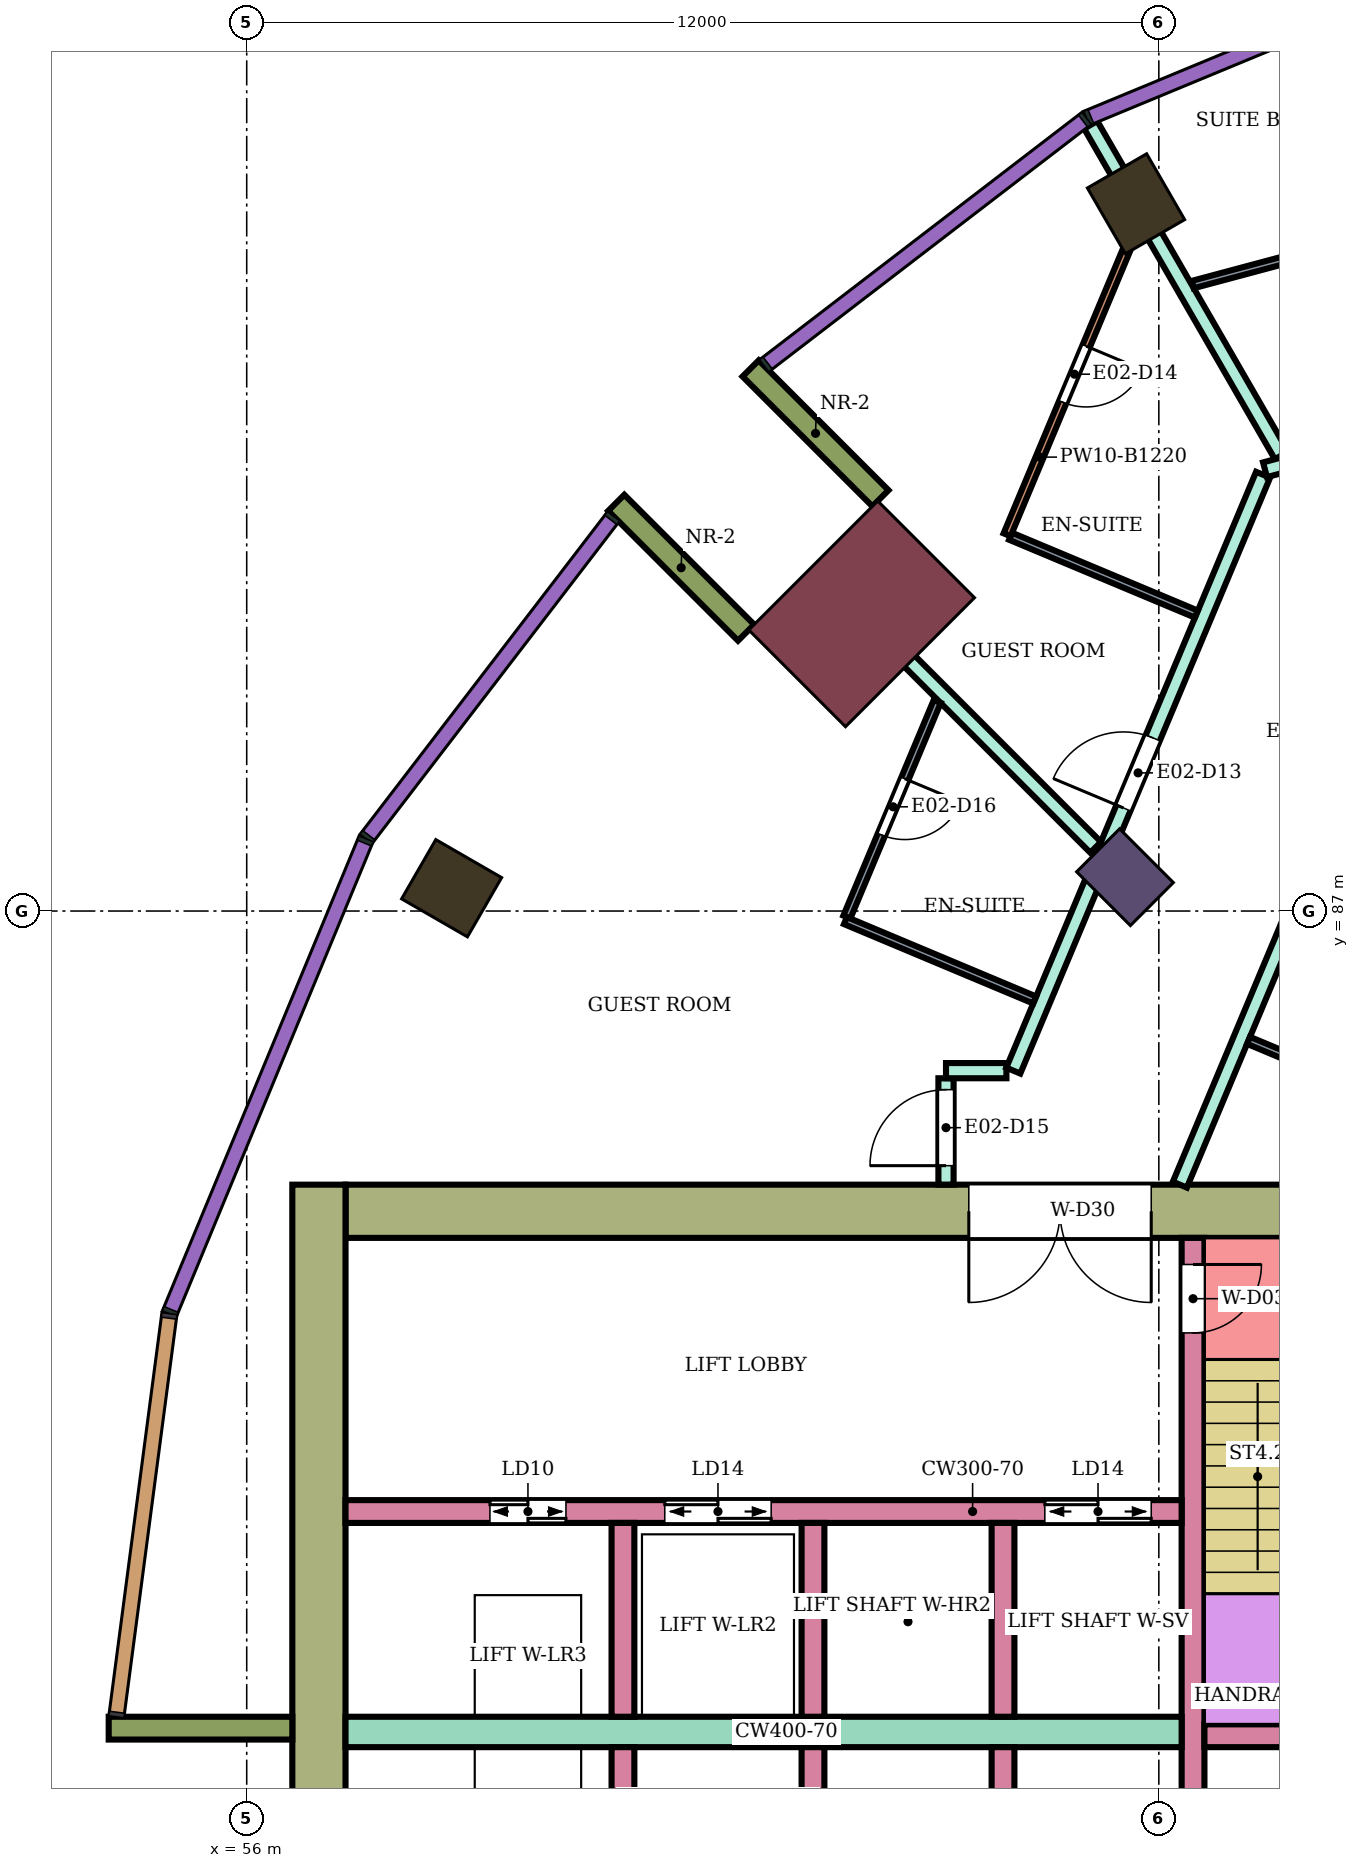
"""IFC4 building model, lengths in metres.
Left out: names, types, materials, properties, quantities, classifications, styles, units other than length and angle.
Written with IfcOpenShell. Run it as: python <this file> out.ifc"""

import sys

from ifc_helpers import new_model, si_unit, direction, frame, frame_2d, origin, origin_2d, place, context, subcontext, project, spatial, rectangle, extrude, element, fill, save


model = new_model("IFC4")
c1 = context("Model", 3, precision=1e-05, world=origin(), true_north=direction((0.0, 1.0)))
c2 = subcontext(c1, "Body", "Model", "MODEL_VIEW")
j1 = project(units=[si_unit("LENGTHUNIT", "METRE"), si_unit("PLANEANGLEUNIT", "RADIAN")], contexts=[c1])
p1 = place(None, origin())
s1 = spatial("IfcSite", under=j1, at=p1, CompositionType="ELEMENT")
p2 = place(p1, origin())
s2 = spatial("IfcBuilding", under=s1, at=p2, CompositionType="ELEMENT")
p3 = place(p2, frame((0.0, 0.0, 126.3)))
s3 = spatial("IfcBuildingStorey", under=s2, at=p3, CompositionType="ELEMENT", Elevation=126.3)
for number, where, z_axis, x_axis in (
    (1, (67.7, 96.304, 0.0), (0.0, 0.0, 1.0), (-0.5, 0.866, 0.0)),
    (2, (58.696, 87.3, 0.0), (0.0, 0.0, 1.0), (-0.866, 0.5, 0.0)),
):
    element("IfcColumn", number, at=place(p3, frame(where, z_axis=z_axis, x_axis=x_axis)), inside=s3, PredefinedType="COLUMN", context=c2, shape_type="SweptSolid", body=[
        extrude(rectangle(XDim=1.0, YDim=0.9, at=origin_2d()), origin(), (0.0, 0.0, 1.0), 3.9),
    ])
p4 = place(p3, frame((67.555, 87.445, 0.0), z_axis=(0.0, 0.0, 1.0), x_axis=(-0.707106781187, 0.707106781187, 0.0)))
e3 = element("IfcColumn", 3, at=p4, inside=s3, PredefinedType="COLUMN", context=c2, shape_type="SweptSolid", body=[
    extrude(rectangle(XDim=1.0, YDim=0.8, at=origin_2d()), origin(), (0.0, 0.0, 1.0), 3.9),
])
p5 = place(p3, frame((64.09, 90.91, 0.0), z_axis=(0.0, 0.0, 1.0), x_axis=(-0.707106781187, 0.707106781187, 0.0)))
e4 = element("IfcColumn", 4, at=p5, inside=s3, PredefinedType="COLUMN", context=c2, shape_type="SweptSolid", body=[
    extrude(rectangle(XDim=1.8, YDim=2.4, at=origin_2d()), origin(), (0.0, 0.0, 1.0), 3.9),
])
p6 = place(p3, frame((72.1, 83.05, 0.0), z_axis=(0.0, 0.0, 1.0), x_axis=(-1.0, 0.0, 0.0)))
e5 = element("IfcWall", 5, at=p6, inside=s3, PredefinedType="SHEAR", context=c2, shape_type="SweptSolid", body=[
    extrude(rectangle(XDim=14.8, YDim=0.7, at=frame_2d((7.4, 0.0))), origin(), (0.0, 0.0, 1.0), 3.58),
])
p7 = place(p6, frame((4.2, 0.0, 0.0)))
e6 = element("IfcOpeningElement", 6, at=p7, cuts=e5, PredefinedType="OPENING", context=c2, shape_type="SweptSolid", body=[
    extrude(rectangle(XDim=2.4, YDim=2.4, at=frame_2d((1.2, 1.2))), frame((0.0, 0.36, 0.0), z_axis=(0.0, -1.0, 0.0), x_axis=(1.0, 0.0, 0.0)), (0.0, 0.0, 1.0), 0.72),
])
p8 = place(p3, frame((56.95, 83.4, 0.0), z_axis=(0.0, 0.0, 1.0), x_axis=(0.0, -1.0, 0.0)))
e7 = element("IfcWall", 7, at=p8, inside=s3, PredefinedType="SHEAR", context=c2, shape_type="SweptSolid", body=[
    extrude(rectangle(XDim=16.8, YDim=0.7, at=frame_2d((8.4, 0.0))), origin(), (0.0, 0.0, 1.0), 3.58),
])
p9 = place(p3, frame((68.45, 82.7, 0.0), z_axis=(0.0, 0.0, 1.0), x_axis=(0.0, -1.0, 0.0)))
e8 = element("IfcWall", 8, at=p9, inside=s3, PredefinedType="SHEAR", context=c2, shape_type="SweptSolid", body=[
    extrude(rectangle(XDim=7.7, YDim=0.3, at=frame_2d((3.85, 0.0))), origin(), (0.0, 0.0, 1.0), 3.58),
])
p10 = place(p9, frame((0.35, 0.0, 0.0)))
e9 = element("IfcOpeningElement", 9, at=p10, cuts=e8, PredefinedType="OPENING", context=c2, shape_type="SweptSolid", body=[
    extrude(rectangle(XDim=0.9, YDim=2.1, at=frame_2d((0.45, 1.05))), frame((0.0, 0.16, 0.0), z_axis=(0.0, -1.0, 0.0), x_axis=(1.0, 0.0, 0.0)), (0.0, 0.0, 1.0), 0.32),
])
p11 = place(p3, frame((71.65, 76.15, 0.0), z_axis=(0.0, 0.0, 1.0), x_axis=(-1.0, 0.0, 0.0)))
e10 = element("IfcWall", 10, at=p11, inside=s3, PredefinedType="SHEAR", context=c2, shape_type="SweptSolid", body=[
    extrude(rectangle(XDim=3.05, YDim=0.3, at=frame_2d((1.525, 0.0))), origin(), (0.0, 0.0, 1.0), 3.58),
])
p12 = place(p3, frame((68.3, 76.2, 0.0), z_axis=(0.0, 0.0, 1.0), x_axis=(-1.0, 0.0, 0.0)))
e11 = element("IfcWall", 11, at=p12, inside=s3, PredefinedType="SHEAR", context=c2, shape_type="SweptSolid", body=[
    extrude(rectangle(XDim=11.0, YDim=0.4, at=frame_2d((5.5, 0.0))), origin(), (0.0, 0.0, 1.0), 3.58),
])
p13 = place(p3, frame((68.3, 79.1, 0.0), z_axis=(0.0, 0.0, 1.0), x_axis=(-1.0, 0.0, 0.0)))
e12 = element("IfcWall", 12, at=p13, inside=s3, PredefinedType="SHEAR", context=c2, shape_type="SweptSolid", body=[
    extrude(rectangle(XDim=11.0, YDim=0.3, at=frame_2d((5.5, 0.0))), origin(), (0.0, 0.0, 1.0), 3.58),
])
p14 = place(p13, frame((0.4, 0.0, 0.0)))
e13 = element("IfcOpeningElement", 13, at=p14, cuts=e12, PredefinedType="OPENING", context=c2, shape_type="SweptSolid", body=[
    extrude(rectangle(XDim=1.4, YDim=2.1, at=frame_2d((0.7, 1.05))), frame((0.0, 0.16, 0.0), z_axis=(0.0, -1.0, 0.0), x_axis=(1.0, 0.0, 0.0)), (0.0, 0.0, 1.0), 0.32),
])
p15 = place(p13, frame((5.4, 0.0, 0.0)))
e14 = element("IfcOpeningElement", 14, at=p15, cuts=e12, PredefinedType="OPENING", context=c2, shape_type="SweptSolid", body=[
    extrude(rectangle(XDim=1.4, YDim=2.1, at=frame_2d((0.7, 1.05))), frame((0.0, 0.16, 0.0), z_axis=(0.0, -1.0, 0.0), x_axis=(1.0, 0.0, 0.0)), (0.0, 0.0, 1.0), 0.32),
])
p16 = place(p13, frame((8.1, 0.0, 0.0)))
e15 = element("IfcOpeningElement", 15, at=p16, cuts=e12, PredefinedType="OPENING", context=c2, shape_type="SweptSolid", body=[
    extrude(rectangle(XDim=1.0, YDim=2.1, at=frame_2d((0.5, 1.05))), frame((0.0, 0.16, 0.0), z_axis=(0.0, -1.0, 0.0), x_axis=(1.0, 0.0, 0.0)), (0.0, 0.0, 1.0), 0.32),
])
for number, where, z_axis, x_axis in (
    (16, (65.95, 76.0, 0.0), (0.0, 0.0, 1.0), (0.0, -1.0, 0.0)),
    (17, (63.45, 76.0, 0.0), (0.0, 0.0, 1.0), (0.0, -1.0, 0.0)),
    (18, (60.95, 76.0, 0.0), (0.0, 0.0, 1.0), (0.0, -1.0, 0.0)),
    (19, (65.95, 78.95, 0.0), (0.0, 0.0, 1.0), (0.0, -1.0, 0.0)),
    (20, (63.45, 78.95, 0.0), (0.0, 0.0, 1.0), (0.0, -1.0, 0.0)),
    (21, (60.95, 78.95, 0.0), (0.0, 0.0, 1.0), (0.0, -1.0, 0.0)),
):
    element("IfcWall", number, at=place(p3, frame(where, z_axis=z_axis, x_axis=x_axis)), inside=s3, PredefinedType="SHEAR", context=c2, shape_type="SweptSolid", body=[
        extrude(rectangle(XDim=2.55, YDim=0.3, at=frame_2d((1.275, 0.0))), origin(), (0.0, 0.0, 1.0), 3.58),
    ])
for number, where, z_axis, x_axis in (
    (22, (64.338, 92.43, 0.0), (0.0, 0.0, 1.0), (-0.707, 0.707, 0.0)),
    (23, (62.57, 90.662, 0.0), (0.0, 0.0, 1.0), (-0.707, 0.707, 0.0)),
    (24, (56.6, 76.25, 0.0), (0.0, 0.0, 1.0), (-1.0, 0.0, 0.0)),
):
    element("IfcWall", number, at=place(p3, frame(where, z_axis=z_axis, x_axis=x_axis)), inside=s3, PredefinedType="NOTDEFINED", context=c2, shape_type="SweptSolid", body=[
        extrude(rectangle(XDim=2.416, YDim=0.3, at=frame_2d((1.208, 0.0))), origin(), (0.0, 0.0, 1.0), 3.9),
    ])
p17 = place(p3, frame((63.6, 91.409, 0.0), z_axis=(0.0, 0.0, 1.0), x_axis=(0.706937509868, -0.707276011993, 0.0)))
e25 = element("IfcWall", 25, at=p17, inside=s3, PredefinedType="PARTITIONING", context=c2, shape_type="SweptSolid", body=[
    extrude(rectangle(XDim=5.049, YDim=0.2, at=frame_2d((2.524, 0.0))), origin(), (0.0, 0.0, 1.0), 3.45),
])
p18 = place(p3, frame((65.2, 83.401, 0.0), z_axis=(0.0, 0.0, 1.0), x_axis=(0.0, 1.0, 0.0)))
e26 = element("IfcWall", 26, at=p18, inside=s3, PredefinedType="PARTITIONING", context=c2, shape_type="SweptSolid", body=[
    extrude(rectangle(XDim=1.399, YDim=0.2, at=frame_2d((0.7, 0.0))), origin(), (0.0, 0.0, 1.0), 3.45),
])
p19 = place(p18, frame((0.249, 0.0, 0.0)))
e27 = element("IfcOpeningElement", 27, at=p19, cuts=e26, PredefinedType="OPENING", context=c2, shape_type="SweptSolid", body=[
    extrude(rectangle(XDim=1.0, YDim=2.1, at=frame_2d((0.5, 1.05))), frame((0.0, 0.11, 0.0), z_axis=(0.0, -1.0, 0.0), x_axis=(1.0, 0.0, 0.0)), (0.0, 0.0, 1.0), 0.22),
])
p20 = place(p3, frame((65.2, 84.9, 0.0), z_axis=(0.0, 0.0, 1.0), x_axis=(1.0, 0.0, 0.0)))
e28 = element("IfcWall", 28, at=p20, inside=s3, PredefinedType="PARTITIONING", context=c2, shape_type="SweptSolid", body=[
    extrude(rectangle(XDim=0.795, YDim=0.2, at=frame_2d((0.397, 0.0))), origin(), (0.0, 0.0, 1.0), 3.45),
])
p21 = place(p3, frame((66.085, 84.9, 0.0), z_axis=(0.0, 0.0, 1.0), x_axis=(0.386617151403, 0.922240303956, 0.0)))
e29 = element("IfcWall", 29, at=p21, inside=s3, PredefinedType="PARTITIONING", context=c2, shape_type="SweptSolid", body=[
    extrude(rectangle(XDim=8.5, YDim=0.2, at=frame_2d((4.25, 0.0))), origin(), (0.0, 0.0, 1.0), 3.45),
])
p22 = place(p21, frame((3.748, 0.0, 0.0)))
e30 = element("IfcOpeningElement", 30, at=p22, cuts=e29, PredefinedType="OPENING", context=c2, shape_type="SweptSolid", body=[
    extrude(rectangle(XDim=1.0, YDim=2.1, at=frame_2d((0.5, 1.05))), frame((0.0, 0.11, 0.0), z_axis=(0.0, -1.0, 0.0), x_axis=(1.0, 0.0, 0.0)), (0.0, 0.0, 1.0), 0.22),
])
p23 = place(p3, frame((67.104, 97.343, 0.0), z_axis=(0.0, 0.0, 1.0), x_axis=(0.499893606134, -0.866086821598, 0.0)))
e31 = element("IfcWall", 31, at=p23, inside=s3, PredefinedType="PARTITIONING", context=c2, shape_type="SweptSolid", body=[
    extrude(rectangle(XDim=5.021, YDim=0.2, at=frame_2d((2.511, 0.0))), origin(), (0.0, 0.0, 1.0), 3.45),
])
p24 = place(p3, frame((68.277, 83.4, 0.0), z_axis=(0.0, 0.0, 1.0), x_axis=(0.386454861164, 0.922308321703, 0.0)))
e32 = element("IfcWall", 32, at=p24, inside=s3, PredefinedType="PARTITIONING", context=c2, shape_type="SweptSolid", body=[
    extrude(rectangle(XDim=7.762, YDim=0.2, at=frame_2d((3.881, 0.0))), origin(), (0.0, 0.0, 1.0), 3.45),
])
p25 = place(p24, frame((5.351, 0.0, 0.0)))
e33 = element("IfcOpeningElement", 33, at=p25, cuts=e32, PredefinedType="OPENING", context=c2, shape_type="SweptSolid", body=[
    extrude(rectangle(XDim=1.0, YDim=2.1, at=frame_2d((0.5, 1.05))), frame((0.0, 0.11, 0.0), z_axis=(0.0, -1.0, 0.0), x_axis=(1.0, 0.0, 0.0)), (0.0, 0.0, 1.0), 0.22),
])
p26 = place(p3, frame((69.397, 92.805, 0.0), z_axis=(0.0, 0.0, 1.0), x_axis=(0.965971666602, 0.258647906087, 0.0)))
e34 = element("IfcWall", 34, at=p26, inside=s3, PredefinedType="PARTITIONING", context=c2, shape_type="SweptSolid", body=[
    extrude(rectangle(XDim=10.887, YDim=0.2, at=frame_2d((5.443, 0.0))), origin(), (0.0, 0.0, 1.0), 3.45),
])
p27 = place(p26, frame((6.163, 0.0, 0.0)))
e35 = element("IfcOpeningElement", 35, at=p27, cuts=e34, PredefinedType="OPENING", context=c2, shape_type="SweptSolid", body=[
    extrude(rectangle(XDim=1.0, YDim=2.1, at=frame_2d((0.5, 1.05))), frame((0.0, 0.11, 0.0), z_axis=(0.0, -1.0, 0.0), x_axis=(1.0, 0.0, 0.0)), (0.0, 0.0, 1.0), 0.22),
])
p28 = place(p26, frame((2.461, 0.0, 0.0)))
e36 = element("IfcOpeningElement", 36, at=p28, cuts=e34, PredefinedType="OPENING", context=c2, shape_type="SweptSolid", body=[
    extrude(rectangle(XDim=1.0, YDim=2.1, at=frame_2d((0.5, 1.05))), frame((0.0, 0.11, 0.0), z_axis=(0.0, -1.0, 0.0), x_axis=(1.0, 0.0, 0.0)), (0.0, 0.0, 1.0), 0.22),
])
p29 = place(p3, frame((63.896, 86.92, 0.0), z_axis=(0.0, 0.0, 1.0), x_axis=(0.386637413037, 0.922231809709, 0.0)))
e37 = element("IfcWall", 37, at=p29, inside=s3, PredefinedType="PARTITIONING", context=c2, shape_type="SweptSolid", body=[
    extrude(rectangle(XDim=3.076, YDim=0.1, at=frame_2d((1.538, 0.0))), origin(), (0.0, 0.0, 1.0), 3.45),
])
p30 = place(p29, frame((1.173, 0.0, 0.0)))
e38 = element("IfcOpeningElement", 38, at=p30, cuts=e37, PredefinedType="OPENING", context=c2, shape_type="SweptSolid", body=[
    extrude(rectangle(XDim=0.8, YDim=2.1, at=frame_2d((0.4, 1.05))), frame((0.0, 0.06, 0.0), z_axis=(0.0, -1.0, 0.0), x_axis=(1.0, 0.0, 0.0)), (0.0, 0.0, 1.0), 0.12),
])
p31 = place(p3, frame((63.877, 86.874, 0.0), z_axis=(0.0, 0.0, 1.0), x_axis=(0.92214860299, -0.386835823062, 0.0)))
e39 = element("IfcWall", 39, at=p31, inside=s3, PredefinedType="PARTITIONING", context=c2, shape_type="SweptSolid", body=[
    extrude(rectangle(XDim=2.7, YDim=0.1, at=frame_2d((1.35, 0.0))), origin(), (0.0, 0.0, 1.0), 3.45),
])
p32 = place(p3, frame((66.049, 91.931, 0.0), z_axis=(0.0, 0.0, 1.0), x_axis=(0.922344808264, -0.38636777126, 0.0)))
e40 = element("IfcWall", 40, at=p32, inside=s3, PredefinedType="PARTITIONING", context=c2, shape_type="SweptSolid", body=[
    extrude(rectangle(XDim=2.65, YDim=0.1, at=frame_2d((1.325, 0.0))), origin(), (0.0, 0.0, 1.0), 3.45),
])
p33 = place(p3, frame((66.004, 91.95, 0.0), z_axis=(0.0, 0.0, 1.0), x_axis=(0.386601257709, 0.922246966673, 0.0)))
e41 = element("IfcWall", 41, at=p33, inside=s3, PredefinedType="PARTITIONING", context=c2, shape_type="SweptSolid", body=[
    extrude(rectangle(XDim=4.433, YDim=0.1, at=frame_2d((2.216, 0.0))), origin(), (0.0, 0.0, 1.0), 2.68),
])
p34 = place(p33, frame((1.891, 0.0, 0.0)))
e42 = element("IfcOpeningElement", 42, at=p34, cuts=e41, PredefinedType="OPENING", context=c2, shape_type="SweptSolid", body=[
    extrude(rectangle(XDim=0.8, YDim=2.1, at=frame_2d((0.4, 1.05))), frame((0.0, 0.06, 0.0), z_axis=(0.0, -1.0, 0.0), x_axis=(1.0, 0.0, 0.0)), (0.0, 0.0, 1.0), 0.12),
])
p35 = place(p3, frame((68.447, 95.242, 0.0), z_axis=(0.0, 0.0, 1.0), x_axis=(0.965958178477, 0.258698274894, 0.0)))
e43 = element("IfcWall", 43, at=p35, inside=s3, PredefinedType="PARTITIONING", context=c2, shape_type="SweptSolid", body=[
    extrude(rectangle(XDim=5.81, YDim=0.1, at=frame_2d((2.905, 0.0))), origin(), (0.0, 0.0, 1.0), 3.45),
])
p36 = place(p35, frame((1.46, 0.0, 0.0)))
e44 = element("IfcOpeningElement", 44, at=p36, cuts=e43, PredefinedType="OPENING", context=c2, shape_type="SweptSolid", body=[
    extrude(rectangle(XDim=0.9, YDim=2.1, at=frame_2d((0.45, 1.05))), frame((0.0, 0.06, 0.0), z_axis=(0.0, -1.0, 0.0), x_axis=(1.0, 0.0, 0.0)), (0.0, 0.0, 1.0), 0.12),
])
p37 = place(p3, frame((69.181, 85.298, 0.0), z_axis=(0.0, 0.0, 1.0), x_axis=(0.922377635784, -0.38628939541, 0.0)))
e45 = element("IfcWall", 45, at=p37, inside=s3, PredefinedType="PARTITIONING", context=c2, shape_type="SweptSolid", body=[
    extrude(rectangle(XDim=2.65, YDim=0.1, at=frame_2d((1.325, 0.0))), origin(), (0.0, 0.0, 1.0), 3.45),
])
p38 = place(p37, frame((0.9, 0.0, 0.0)))
e46 = element("IfcOpeningElement", 46, at=p38, cuts=e45, PredefinedType="OPENING", context=c2, shape_type="SweptSolid", body=[
    extrude(rectangle(XDim=0.8, YDim=2.1, at=frame_2d((0.4, 1.05))), frame((0.0, 0.06, 0.0), z_axis=(0.0, -1.0, 0.0), x_axis=(1.0, 0.0, 0.0)), (0.0, 0.0, 1.0), 0.12),
])
p39 = place(p22, origin())
e47 = element("IfcDoor", 47, at=p39, inside=s3, OperationType="SINGLE_SWING_LEFT", PredefinedType="DOOR", context=c2, shape_type="SweptSolid", body=[
    extrude(rectangle(XDim=1.0, YDim=2.1, at=frame_2d((0.5, 1.05))), frame((0.0, 0.025, 0.0), z_axis=(0.0, -1.0, 0.0), x_axis=(1.0, 0.0, 0.0)), (0.0, 0.0, 1.0), 0.05),
])
fill(e30, e47)
p40 = place(p34, frame((0.8, 0.0, 0.0), z_axis=(0.0, 0.0, 1.0), x_axis=(-1.0, 0.0, 0.0)))
e48 = element("IfcDoor", 48, at=p40, inside=s3, OperationType="SINGLE_SWING_LEFT", PredefinedType="DOOR", context=c2, shape_type="SweptSolid", body=[
    extrude(rectangle(XDim=0.8, YDim=2.1, at=frame_2d((0.4, 1.05))), frame((0.0, 0.025, 0.0), z_axis=(0.0, -1.0, 0.0), x_axis=(1.0, 0.0, 0.0)), (0.0, 0.0, 1.0), 0.05),
])
fill(e42, e48)
p41 = place(p19, origin())
e49 = element("IfcDoor", 49, at=p41, inside=s3, OperationType="SINGLE_SWING_LEFT", PredefinedType="DOOR", context=c2, shape_type="SweptSolid", body=[
    extrude(rectangle(XDim=1.0, YDim=2.1, at=frame_2d((0.5, 1.05))), frame((0.0, 0.025, 0.0), z_axis=(0.0, -1.0, 0.0), x_axis=(1.0, 0.0, 0.0)), (0.0, 0.0, 1.0), 0.05),
])
fill(e27, e49)
p42 = place(p30, frame((0.8, 0.0, 0.0), z_axis=(0.0, 0.0, 1.0), x_axis=(-1.0, 0.0, 0.0)))
e50 = element("IfcDoor", 50, at=p42, inside=s3, OperationType="SINGLE_SWING_LEFT", PredefinedType="DOOR", context=c2, shape_type="SweptSolid", body=[
    extrude(rectangle(XDim=0.8, YDim=2.1, at=frame_2d((0.4, 1.05))), frame((0.0, 0.025, 0.0), z_axis=(0.0, -1.0, 0.0), x_axis=(1.0, 0.0, 0.0)), (0.0, 0.0, 1.0), 0.05),
])
fill(e38, e50)
p43 = place(p10, origin())
e51 = element("IfcDoor", 51, at=p43, inside=s3, OperationType="SINGLE_SWING_LEFT", PredefinedType="DOOR", context=c2, shape_type="SweptSolid", body=[
    extrude(rectangle(XDim=0.9, YDim=2.1, at=frame_2d((0.45, 1.05))), frame((0.0, 0.025, 0.0), z_axis=(0.0, -1.0, 0.0), x_axis=(1.0, 0.0, 0.0)), (0.0, 0.0, 1.0), 0.05),
])
fill(e9, e51)
p44 = place(p14, origin())
e52 = element("IfcDoor", 52, at=p44, inside=s3, OperationType="DOUBLE_DOOR_SLIDING", PredefinedType="DOOR", context=c2, shape_type="SweptSolid", body=[
    extrude(rectangle(XDim=1.4, YDim=2.1, at=frame_2d((0.7, 1.05))), frame((0.0, 0.025, 0.0), z_axis=(0.0, -1.0, 0.0), x_axis=(1.0, 0.0, 0.0)), (0.0, 0.0, 1.0), 0.05),
])
fill(e13, e52)
p45 = place(p15, origin())
e53 = element("IfcDoor", 53, at=p45, inside=s3, OperationType="DOUBLE_DOOR_SLIDING", PredefinedType="DOOR", context=c2, shape_type="SweptSolid", body=[
    extrude(rectangle(XDim=1.4, YDim=2.1, at=frame_2d((0.7, 1.05))), frame((0.0, 0.025, 0.0), z_axis=(0.0, -1.0, 0.0), x_axis=(1.0, 0.0, 0.0)), (0.0, 0.0, 1.0), 0.05),
])
fill(e14, e53)
p46 = place(p16, origin())
e54 = element("IfcDoor", 54, at=p46, inside=s3, OperationType="DOUBLE_DOOR_SLIDING", PredefinedType="DOOR", context=c2, shape_type="SweptSolid", body=[
    extrude(rectangle(XDim=1.0, YDim=2.1, at=frame_2d((0.5, 1.05))), frame((0.0, 0.025, 0.0), z_axis=(0.0, -1.0, 0.0), x_axis=(1.0, 0.0, 0.0)), (0.0, 0.0, 1.0), 0.05),
])
fill(e15, e54)
p47 = place(p7, origin())
e55 = element("IfcDoor", 55, at=p47, inside=s3, OperationType="DOUBLE_DOOR_SINGLE_SWING", PredefinedType="DOOR", context=c2, shape_type="SweptSolid", body=[
    extrude(rectangle(XDim=2.4, YDim=2.4, at=frame_2d((1.2, 1.2))), frame((0.0, 0.025, 0.0), z_axis=(0.0, -1.0, 0.0), x_axis=(1.0, 0.0, 0.0)), (0.0, 0.0, 1.0), 0.05),
])
fill(e6, e55)
save(model, sys.argv[1])
